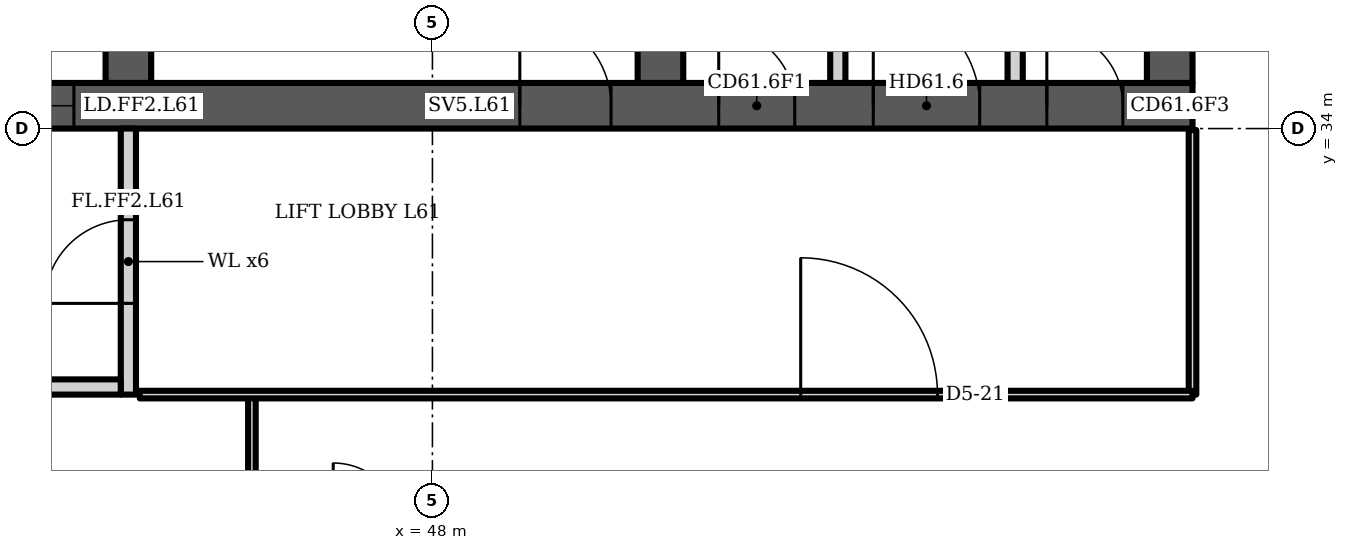
"""IFC4 building model, lengths in metres.
Left out: names, types, materials, properties, quantities, classifications, styles, units other than length and angle.
Written with IfcOpenShell. Run it as: python <this file> out.ifc"""

import sys

from ifc_helpers import new_model, si_unit, direction, frame, frame_2d, origin, place, context, subcontext, project, spatial, polyline, rectangle, outline, extrude, element, fill, save


model = new_model("IFC4")
c1 = context("Model", 3, precision=1e-05, world=origin(), true_north=direction((0.0, 1.0)))
c2 = subcontext(c1, "Body", "Model", "MODEL_VIEW")
j1 = project(units=[si_unit("LENGTHUNIT", "METRE"), si_unit("PLANEANGLEUNIT", "RADIAN")], contexts=[c1])
p1 = place(None, origin())
s1 = spatial("IfcSite", under=j1, at=p1, CompositionType="ELEMENT")
p2 = place(p1, origin())
s2 = spatial("IfcBuilding", under=s1, at=p2, CompositionType="ELEMENT")
p3 = place(p2, frame((0.0, 0.0, 243.1)))
s3 = spatial("IfcBuildingStorey", under=s2, at=p3, CompositionType="ELEMENT", Elevation=243.1)
p4 = place(p3, frame((23.0, 34.3, 0.0), z_axis=(0.0, 0.0, 1.0), x_axis=(1.0, 0.0, 0.0)))
e1 = element("IfcWall", 1, at=p4, inside=s3, PredefinedType="SHEAR", context=c2, shape_type="SweptSolid", body=[
    extrude(rectangle(XDim=35.0, YDim=0.6, at=frame_2d((17.5, 0.0))), origin(), (0.0, 0.0, 1.0), 3.6),
])
p5 = place(p4, frame((0.65, 0.0, 0.0)))
e2 = element("IfcOpeningElement", 2, at=p5, cuts=e1, PredefinedType="OPENING", context=c2, shape_type="SweptSolid", body=[
    extrude(rectangle(XDim=1.2, YDim=2.1, at=frame_2d((0.6, 1.05))), frame((0.0, 0.31, 0.0), z_axis=(0.0, -1.0, 0.0), x_axis=(1.0, 0.0, 0.0)), (0.0, 0.0, 1.0), 0.62),
])
p6 = place(p4, frame((7.717, 0.0, 0.0)))
e3 = element("IfcOpeningElement", 3, at=p6, cuts=e1, PredefinedType="OPENING", context=c2, shape_type="SweptSolid", body=[
    extrude(rectangle(XDim=1.1, YDim=2.1, at=frame_2d((0.55, 1.05))), frame((0.0, 0.31, 0.0), z_axis=(0.0, -1.0, 0.0), x_axis=(1.0, 0.0, 0.0)), (0.0, 0.0, 1.0), 0.62),
])
p7 = place(p4, frame((12.183, 0.0, 0.0)))
e4 = element("IfcOpeningElement", 4, at=p7, cuts=e1, PredefinedType="OPENING", context=c2, shape_type="SweptSolid", body=[
    extrude(rectangle(XDim=1.1, YDim=2.1, at=frame_2d((0.55, 1.05))), frame((0.0, 0.31, 0.0), z_axis=(0.0, -1.0, 0.0), x_axis=(1.0, 0.0, 0.0)), (0.0, 0.0, 1.0), 0.62),
])
p8 = place(p4, frame((9.8, 0.0, 0.0)))
e5 = element("IfcOpeningElement", 5, at=p8, cuts=e1, PredefinedType="OPENING", context=c2, shape_type="SweptSolid", body=[
    extrude(rectangle(XDim=1.4, YDim=2.1, at=frame_2d((0.7, 1.05))), frame((0.0, 0.31, 0.0), z_axis=(0.0, -1.0, 0.0), x_axis=(1.0, 0.0, 0.0)), (0.0, 0.0, 1.0), 0.62),
])
p9 = place(p4, frame((14.717, 0.0, 0.0)))
e6 = element("IfcOpeningElement", 6, at=p9, cuts=e1, PredefinedType="OPENING", context=c2, shape_type="SweptSolid", body=[
    extrude(rectangle(XDim=1.1, YDim=2.1, at=frame_2d((0.55, 1.05))), frame((0.0, 0.31, 0.0), z_axis=(0.0, -1.0, 0.0), x_axis=(1.0, 0.0, 0.0)), (0.0, 0.0, 1.0), 0.62),
])
p10 = place(p4, frame((16.95, 0.0, 0.0)))
e7 = element("IfcOpeningElement", 7, at=p10, cuts=e1, PredefinedType="OPENING", context=c2, shape_type="SweptSolid", body=[
    extrude(rectangle(XDim=1.1, YDim=2.1, at=frame_2d((0.55, 1.05))), frame((0.0, 0.31, 0.0), z_axis=(0.0, -1.0, 0.0), x_axis=(1.0, 0.0, 0.0)), (0.0, 0.0, 1.0), 0.62),
])
p11 = place(p4, frame((19.183, 0.0, 0.0)))
e8 = element("IfcOpeningElement", 8, at=p11, cuts=e1, PredefinedType="OPENING", context=c2, shape_type="SweptSolid", body=[
    extrude(rectangle(XDim=1.1, YDim=2.1, at=frame_2d((0.55, 1.05))), frame((0.0, 0.31, 0.0), z_axis=(0.0, -1.0, 0.0), x_axis=(1.0, 0.0, 0.0)), (0.0, 0.0, 1.0), 0.62),
])
p12 = place(p4, frame((26.15, 0.0, 0.0)))
e9 = element("IfcOpeningElement", 9, at=p12, cuts=e1, PredefinedType="OPENING", context=c2, shape_type="SweptSolid", body=[
    extrude(rectangle(XDim=1.2, YDim=2.1, at=frame_2d((0.6, 1.05))), frame((0.0, 0.31, 0.0), z_axis=(0.0, -1.0, 0.0), x_axis=(1.0, 0.0, 0.0)), (0.0, 0.0, 1.0), 0.62),
])
p13 = place(p4, frame((28.767, 0.0, 0.0)))
e10 = element("IfcOpeningElement", 10, at=p13, cuts=e1, PredefinedType="OPENING", context=c2, shape_type="SweptSolid", body=[
    extrude(rectangle(XDim=1.0, YDim=2.1, at=frame_2d((0.5, 1.05))), frame((0.0, 0.31, 0.0), z_axis=(0.0, -1.0, 0.0), x_axis=(1.0, 0.0, 0.0)), (0.0, 0.0, 1.0), 0.62),
])
p14 = place(p4, frame((33.083, 0.0, 0.0)))
e11 = element("IfcOpeningElement", 11, at=p14, cuts=e1, PredefinedType="OPENING", context=c2, shape_type="SweptSolid", body=[
    extrude(rectangle(XDim=1.0, YDim=2.1, at=frame_2d((0.5, 1.05))), frame((0.0, 0.31, 0.0), z_axis=(0.0, -1.0, 0.0), x_axis=(1.0, 0.0, 0.0)), (0.0, 0.0, 1.0), 0.62),
])
p15 = place(p4, frame((30.8, 0.0, 0.0)))
e12 = element("IfcOpeningElement", 12, at=p15, cuts=e1, PredefinedType="OPENING", context=c2, shape_type="SweptSolid", body=[
    extrude(rectangle(XDim=1.4, YDim=2.1, at=frame_2d((0.7, 1.05))), frame((0.0, 0.31, 0.0), z_axis=(0.0, -1.0, 0.0), x_axis=(1.0, 0.0, 0.0)), (0.0, 0.0, 1.0), 0.62),
])
p16 = place(p3, frame((44.0, 34.6, 0.0), z_axis=(0.0, 0.0, 1.0), x_axis=(0.0, 1.0, 0.0)))
e13 = element("IfcWall", 13, at=p16, inside=s3, PredefinedType="SHEAR", context=c2, shape_type="SweptSolid", body=[
    extrude(rectangle(XDim=14.784, YDim=0.6, at=frame_2d((7.392, 0.0))), origin(), (0.0, 0.0, 1.0), 3.6),
])
p17 = place(p16, frame((11.608, 0.0, 0.0)))
e14 = element("IfcOpeningElement", 14, at=p17, cuts=e13, PredefinedType="OPENING", context=c2, shape_type="SweptSolid", body=[
    extrude(rectangle(XDim=1.0, YDim=2.1, at=frame_2d((0.5, 1.05))), frame((0.0, 0.31, 0.0), z_axis=(0.0, -1.0, 0.0), x_axis=(1.0, 0.0, 0.0)), (0.0, 0.0, 1.0), 0.62),
])
p18 = place(p16, frame((3.8, 0.0, 0.0)))
e15 = element("IfcOpeningElement", 15, at=p18, cuts=e13, PredefinedType="OPENING", context=c2, shape_type="SweptSolid", body=[
    extrude(rectangle(XDim=1.1, YDim=2.1, at=frame_2d((0.55, 1.05))), frame((0.0, 0.31, 0.0), z_axis=(0.0, -1.0, 0.0), x_axis=(1.0, 0.0, 0.0)), (0.0, 0.0, 1.0), 0.62),
])
p19 = place(p3, frame((51.0, 34.6, 0.0), z_axis=(0.0, 0.0, 1.0), x_axis=(0.0, 1.0, 0.0)))
e16 = element("IfcWall", 16, at=p19, inside=s3, PredefinedType="SHEAR", context=c2, shape_type="SweptSolid", body=[
    extrude(rectangle(XDim=14.171, YDim=0.6, at=frame_2d((7.085, 0.0))), origin(), (0.0, 0.0, 1.0), 3.6),
])
p20 = place(p19, frame((3.8, 0.0, 0.0)))
e17 = element("IfcOpeningElement", 17, at=p20, cuts=e16, PredefinedType="OPENING", context=c2, shape_type="SweptSolid", body=[
    extrude(rectangle(XDim=1.1, YDim=2.1, at=frame_2d((0.55, 1.05))), frame((0.0, 0.31, 0.0), z_axis=(0.0, -1.0, 0.0), x_axis=(1.0, 0.0, 0.0)), (0.0, 0.0, 1.0), 0.62),
])
p21 = place(p3, frame((57.7, 34.6, 0.0), z_axis=(0.0, 0.0, 1.0), x_axis=(0.0, 1.0, 0.0)))
e18 = element("IfcWall", 18, at=p21, inside=s3, PredefinedType="SHEAR", context=c2, shape_type="SweptSolid", body=[
    extrude(rectangle(XDim=13.585, YDim=0.6, at=frame_2d((6.792, 0.0))), origin(), (0.0, 0.0, 1.0), 3.6),
])
p22 = place(p3, frame((0.0, 0.0, -0.0)))
e19 = element("IfcWall", 19, at=p22, inside=s3, PredefinedType="PARTITIONING", context=c2, shape_type="SweptSolid", body=[
    extrude(outline(polyline([(41.567, 37.1), (39.433, 37.1), (39.433, 34.6), (39.233, 34.6), (39.233, 37.45), (37.3, 37.45), (37.3, 37.65), (39.233, 37.65), (39.433, 37.65), (39.433, 37.3), (41.567, 37.3), (41.567, 37.35), (41.767, 37.35), (43.7, 37.35), (43.7, 37.15), (41.767, 37.15), (41.767, 34.6), (41.567, 34.6), (41.567, 37.1)])), origin(), (0.0, 0.0, 1.0), 3.2),
])
p23 = place(p3, frame((0.0, 0.0, -0.0)))
e20 = element("IfcWall", 20, at=p23, inside=s3, PredefinedType="PARTITIONING", context=c2, shape_type="SweptSolid", body=[
    extrude(outline(polyline([(53.233, 34.6), (53.233, 37.3), (53.433, 37.3), (53.433, 34.6), (53.233, 34.6)])), origin(), (0.0, 0.0, 1.0), 3.2),
])
p24 = place(p3, frame((0.0, 0.0, -0.0)))
e21 = element("IfcWall", 21, at=p24, inside=s3, PredefinedType="PARTITIONING", context=c2, shape_type="SweptSolid", body=[
    extrude(outline(polyline([(55.567, 34.6), (55.567, 37.3), (55.767, 37.3), (55.767, 34.6), (55.567, 34.6)])), origin(), (0.0, 0.0, 1.0), 3.2),
])
p25 = place(p3, frame((44.0, 30.5, 0.0), z_axis=(0.0, 0.0, 1.0), x_axis=(0.0, 1.0, 0.0)))
e22 = element("IfcWall", 22, at=p25, inside=s3, PredefinedType="PARTITIONING", context=c2, shape_type="SweptSolid", body=[
    extrude(rectangle(XDim=3.5, YDim=0.2, at=frame_2d((1.75, 0.0))), origin(), (0.0, 0.0, 1.0), 3.2),
])
p26 = place(p25, frame((1.2, 0.0, 0.0)))
e23 = element("IfcOpeningElement", 23, at=p26, cuts=e22, PredefinedType="OPENING", context=c2, shape_type="SweptSolid", body=[
    extrude(rectangle(XDim=1.1, YDim=2.1, at=frame_2d((0.55, 1.05))), frame((0.0, 0.11, 0.0), z_axis=(0.0, -1.0, 0.0), x_axis=(1.0, 0.0, 0.0)), (0.0, 0.0, 1.0), 0.22),
])
p27 = place(p3, frame((41.1, 30.6, 0.0), z_axis=(0.0, 0.0, 1.0), x_axis=(1.0, 0.0, 0.0)))
e24 = element("IfcWall", 24, at=p27, inside=s3, PredefinedType="PARTITIONING", context=c2, shape_type="SweptSolid", body=[
    extrude(rectangle(XDim=2.8, YDim=0.2, at=frame_2d((1.4, 0.0))), origin(), (0.0, 0.0, 1.0), 3.2),
])
p28 = place(p3, frame((45.625, 22.36, 0.0), z_axis=(0.0, 0.0, 1.0), x_axis=(0.0, 1.0, 0.0)))
e25 = element("IfcWall", 25, at=p28, inside=s3, PredefinedType="PARTITIONING", context=c2, shape_type="SweptSolid", body=[
    extrude(rectangle(XDim=8.13, YDim=0.1, at=frame_2d((4.065, 0.0))), origin(), (0.0, 0.0, 1.0), 3.2),
])
p29 = place(p3, frame((58.0, 30.5, 0.0), z_axis=(0.0, 0.0, 1.0), x_axis=(0.0, 1.0, 0.0)))
e26 = element("IfcWall", 26, at=p29, inside=s3, PredefinedType="PARTITIONING", context=c2, shape_type="SweptSolid", body=[
    extrude(rectangle(XDim=3.48, YDim=0.1, at=frame_2d((1.74, 0.0))), origin(), (0.0, 0.0, 1.0), 3.2),
])
p30 = place(p3, frame((44.15, 30.5, 0.0), z_axis=(0.0, 0.0, 1.0), x_axis=(1.0, 0.0, 0.0)))
e27 = element("IfcWall", 27, at=p30, inside=s3, PredefinedType="PARTITIONING", context=c2, shape_type="SweptSolid", body=[
    extrude(rectangle(XDim=13.85, YDim=0.1, at=frame_2d((6.925, 0.0))), origin(), (0.0, 0.0, 1.0), 3.2),
])
p31 = place(p30, frame((8.695, 0.0, 0.0)))
e28 = element("IfcOpeningElement", 28, at=p31, cuts=e27, PredefinedType="OPENING", context=c2, shape_type="SweptSolid", body=[
    extrude(rectangle(XDim=1.8, YDim=2.1, at=frame_2d((0.9, 1.05))), frame((0.0, 0.06, 0.0), z_axis=(0.0, -1.0, 0.0), x_axis=(1.0, 0.0, 0.0)), (0.0, 0.0, 1.0), 0.12),
])
p32 = place(p11, origin())
e29 = element("IfcDoor", 29, at=p32, inside=s3, OperationType="DOUBLE_DOOR_SLIDING", PredefinedType="DOOR", context=c2, shape_type="SweptSolid", body=[
    extrude(rectangle(XDim=1.1, YDim=2.1, at=frame_2d((0.55, 1.05))), frame((0.0, 0.025, 0.0), z_axis=(0.0, -1.0, 0.0), x_axis=(1.0, 0.0, 0.0)), (0.0, 0.0, 1.0), 0.05),
])
fill(e8, e29)
p33 = place(p12, origin())
e30 = element("IfcDoor", 30, at=p33, inside=s3, OperationType="SINGLE_SWING_LEFT", PredefinedType="DOOR", context=c2, shape_type="SweptSolid", body=[
    extrude(rectangle(XDim=1.2, YDim=2.1, at=frame_2d((0.6, 1.05))), frame((0.0, 0.025, 0.0), z_axis=(0.0, -1.0, 0.0), x_axis=(1.0, 0.0, 0.0)), (0.0, 0.0, 1.0), 0.05),
])
fill(e9, e30)
p34 = place(p13, origin())
e31 = element("IfcDoor", 31, at=p34, inside=s3, OperationType="SINGLE_SWING_LEFT", PredefinedType="DOOR", context=c2, shape_type="SweptSolid", body=[
    extrude(rectangle(XDim=1.0, YDim=2.1, at=frame_2d((0.5, 1.05))), frame((0.0, 0.025, 0.0), z_axis=(0.0, -1.0, 0.0), x_axis=(1.0, 0.0, 0.0)), (0.0, 0.0, 1.0), 0.05),
])
fill(e10, e31)
p35 = place(p14, origin())
e32 = element("IfcDoor", 32, at=p35, inside=s3, OperationType="SINGLE_SWING_LEFT", PredefinedType="DOOR", context=c2, shape_type="SweptSolid", body=[
    extrude(rectangle(XDim=1.0, YDim=2.1, at=frame_2d((0.5, 1.05))), frame((0.0, 0.025, 0.0), z_axis=(0.0, -1.0, 0.0), x_axis=(1.0, 0.0, 0.0)), (0.0, 0.0, 1.0), 0.05),
])
fill(e11, e32)
p36 = place(p15, origin())
e33 = element("IfcDoor", 33, at=p36, inside=s3, OperationType="DOUBLE_DOOR_SINGLE_SWING", PredefinedType="DOOR", context=c2, shape_type="SweptSolid", body=[
    extrude(rectangle(XDim=1.4, YDim=2.1, at=frame_2d((0.7, 1.05))), frame((0.0, 0.025, 0.0), z_axis=(0.0, -1.0, 0.0), x_axis=(1.0, 0.0, 0.0)), (0.0, 0.0, 1.0), 0.05),
])
fill(e12, e33)
p37 = place(p26, origin())
e34 = element("IfcDoor", 34, at=p37, inside=s3, OperationType="SINGLE_SWING_LEFT", PredefinedType="DOOR", context=c2, shape_type="SweptSolid", body=[
    extrude(rectangle(XDim=1.1, YDim=2.1, at=frame_2d((0.55, 1.05))), frame((0.0, 0.025, 0.0), z_axis=(0.0, -1.0, 0.0), x_axis=(1.0, 0.0, 0.0)), (0.0, 0.0, 1.0), 0.05),
])
fill(e23, e34)
p38 = place(p31, origin())
e35 = element("IfcDoor", 35, at=p38, inside=s3, OperationType="DOUBLE_DOOR_SINGLE_SWING", PredefinedType="DOOR", context=c2, shape_type="SweptSolid", body=[
    extrude(rectangle(XDim=1.8, YDim=2.1, at=frame_2d((0.9, 1.05))), frame((0.0, 0.025, 0.0), z_axis=(0.0, -1.0, 0.0), x_axis=(1.0, 0.0, 0.0)), (0.0, 0.0, 1.0), 0.05),
])
fill(e28, e35)
save(model, sys.argv[1])
